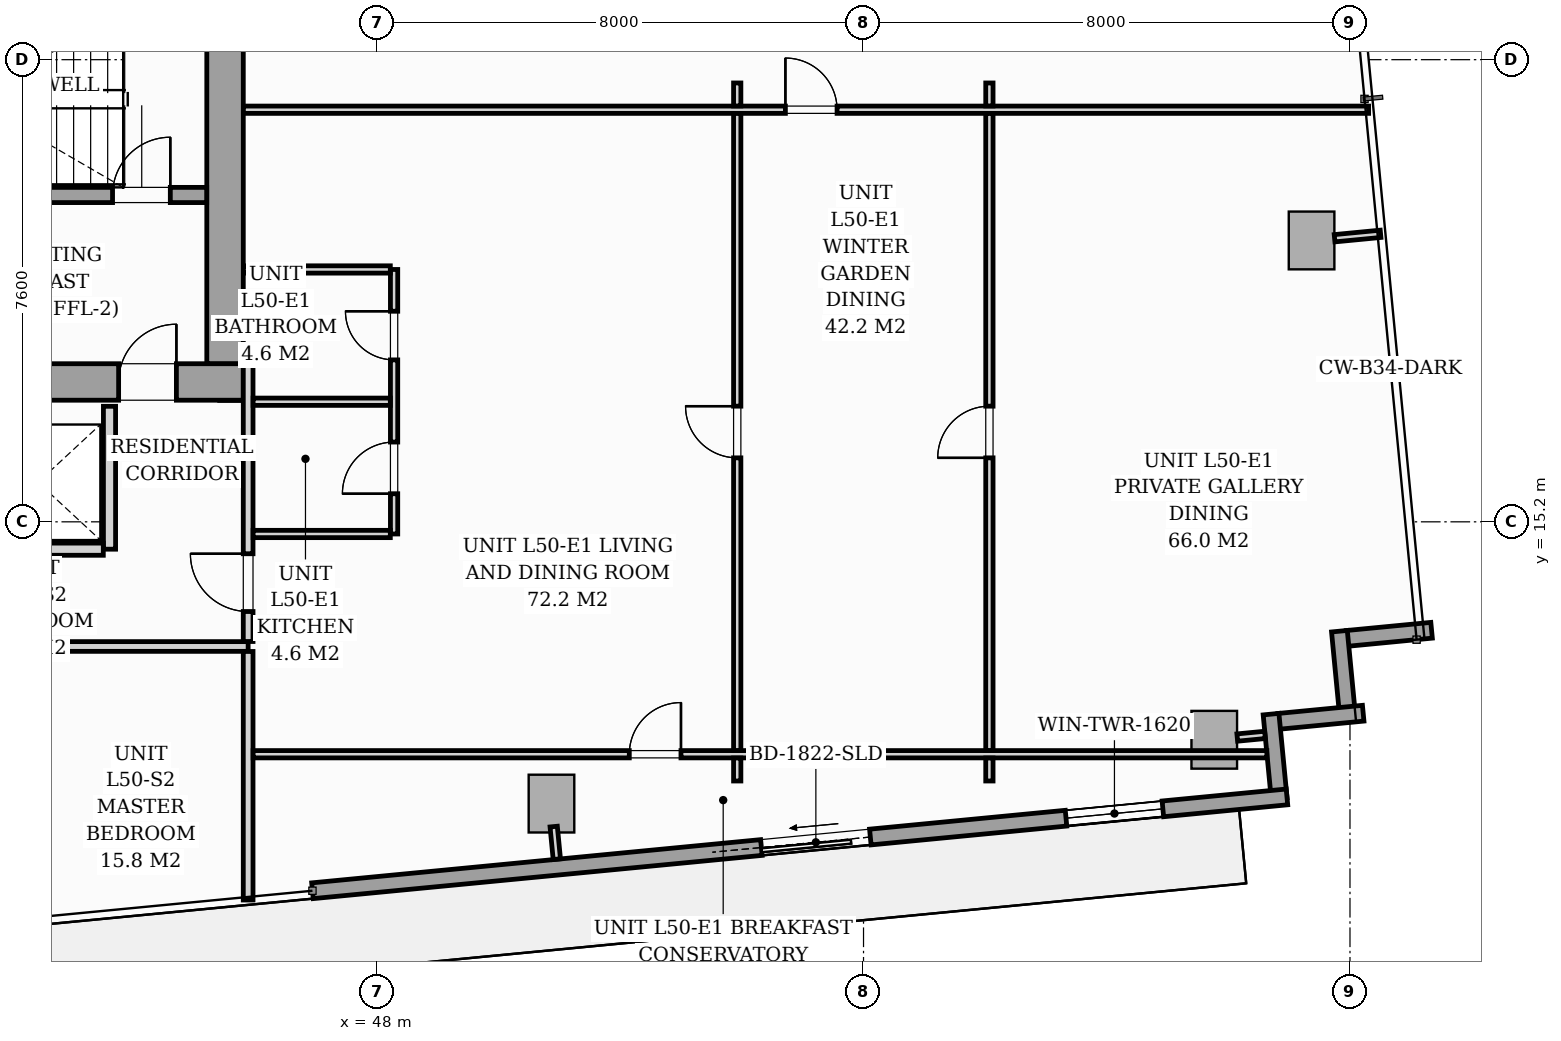
"""IFC4 building model, lengths in metres.
Left out: names, types, materials, properties, quantities, classifications, styles, units other than length and angle.
Written with IfcOpenShell. Run it as: python <this file> out.ifc"""

import sys

from ifc_helpers import new_model, si_unit, direction, frame, frame_2d, origin, origin_2d, place, context, subcontext, project, spatial, rectangle, i_section, extrude, source, transform, mapped, element, fill, save


model = new_model("IFC4")
c1 = context("Model", 3, precision=1e-05, world=origin(), true_north=direction((0.0, 1.0)))
c2 = subcontext(c1, "Body", "Model", "MODEL_VIEW")
j1 = project(units=[si_unit("LENGTHUNIT", "METRE"), si_unit("PLANEANGLEUNIT", "RADIAN")], contexts=[c1])
p1 = place(None, origin())
s1 = spatial("IfcSite", under=j1, at=p1, CompositionType="ELEMENT")
p2 = place(p1, origin())
s2 = spatial("IfcBuilding", under=s1, at=p2, CompositionType="ELEMENT")
p3 = place(p2, frame((0.0, 0.0, 176.2)))
s3 = spatial("IfcBuildingStorey", under=s2, at=p3, CompositionType="ELEMENT", Elevation=176.2)
m1 = source(origin(), c2, "Body", "SweptSolid", [
    extrude(i_section(OverallWidth=0.416, OverallDepth=0.446, WebThickness=0.039, FlangeThickness=0.063, FilletRadius=0.018, at=origin_2d()), origin(), (0.0, 0.0, 1.0), 3.196),
])
p4 = place(p3, frame((45.6, 17.4, 0.002), z_axis=(0.0, 0.0, 1.0), x_axis=(1.0, 0.0, 0.0)))
e1 = element("IfcColumn", 1, at=p4, inside=s3, PredefinedType="PILASTER", context=c2, shape_type="MappedRepresentation", body=[
    mapped(m1, transform((0.0, 0.0, 0.0), scale=1.0)),
])
m2 = source(origin(), c2, "Body", "SweptSolid", [
    extrude(rectangle(XDim=0.75, YDim=0.95, at=origin_2d()), origin(), (0.0, 0.0, 1.0), 3.196),
])
for number, where, z_axis, x_axis in (
    (2, (50.868, 10.566, 0.002), (0.0, 0.0, 1.0), (0.995, 0.096, 0.0)),
    (3, (61.768, 11.616, 0.002), (0.0, 0.0, 1.0), (0.995, 0.096, 0.0)),
    (4, (63.368, 19.827, 0.002), (0.0, 0.0, 1.0), (0.995, 0.096, 0.0)),
):
    element("IfcColumn", number, at=place(p3, frame(where, z_axis=z_axis, x_axis=x_axis)), inside=s3, PredefinedType="COLUMN", context=c2, shape_type="MappedRepresentation", body=[
        mapped(m2, transform((0.0, 0.0, 0.0), scale=1.0)),
    ])
p5 = place(p3, frame((65.342, 13.417, 0.0), z_axis=(0.0, 0.0, 1.0), x_axis=(-0.99540774648, -0.095725744959, 0.0)))
e5 = element("IfcWall", 5, at=p5, inside=s3, PredefinedType="STANDARD", context=c2, shape_type="SweptSolid", body=[
    extrude(rectangle(XDim=1.395, YDim=0.26, at=frame_2d((0.698, 0.0))), origin(), (0.0, 0.0, 1.0), 2.94),
])
p6 = place(p3, frame((63.826, 13.401, 0.0), z_axis=(0.0, 0.0, 1.0), x_axis=(0.095915846097, -0.995389446633, 0.0)))
e6 = element("IfcWall", 6, at=p6, inside=s3, PredefinedType="STANDARD", context=c2, shape_type="SweptSolid", body=[
    extrude(rectangle(XDim=1.395, YDim=0.26, at=frame_2d((0.697, 0.0))), origin(), (0.0, 0.0, 1.0), 2.94),
])
for number, where, z_axis, x_axis in (
    (7, (64.217, 12.053, 0.0), (0.0, 0.0, 1.0), (-0.995, -0.096, 0.0)),
    (8, (62.702, 12.037, 0.0), (0.0, 0.0, 1.0), (0.096, -0.995, 0.0)),
):
    element("IfcWall", number, at=place(p3, frame(where, z_axis=z_axis, x_axis=x_axis)), inside=s3, PredefinedType="STANDARD", context=c2, shape_type="SweptSolid", body=[
        extrude(rectangle(XDim=1.395, YDim=0.26, at=frame_2d((0.698, 0.0))), origin(), (0.0, 0.0, 1.0), 2.94),
    ])
p7 = place(p3, frame((62.963, 10.676, 0.0), z_axis=(0.0, 0.0, 1.0), x_axis=(-0.995395627913, -0.095851676732, 0.0)))
e9 = element("IfcWall", 9, at=p7, inside=s3, PredefinedType="STANDARD", context=c2, shape_type="SweptSolid", body=[
    extrude(rectangle(XDim=16.1, YDim=0.26, at=frame_2d((8.05, 0.0))), origin(), (0.0, 0.0, 1.0), 2.94),
])
p8 = place(p7, frame((6.883, 0.0, 0.0)))
e10 = element("IfcOpeningElement", 10, at=p8, cuts=e9, PredefinedType="OPENING", context=c2, shape_type="SweptSolid", body=[
    extrude(rectangle(XDim=1.8, YDim=2.06, at=frame_2d((0.9, 1.03))), frame((0.0, 0.14, 0.0), z_axis=(0.0, -1.0, 0.0), x_axis=(1.0, 0.0, 0.0)), (0.0, 0.0, 1.0), 0.28),
])
p9 = place(p7, frame((2.05, 0.0, 0.65)))
e11 = element("IfcOpeningElement", 11, at=p9, cuts=e9, PredefinedType="OPENING", context=c2, shape_type="SweptSolid", body=[
    extrude(rectangle(XDim=1.6, YDim=1.5, at=frame_2d((0.8, 0.75))), frame((0.0, 0.14, 0.0), z_axis=(0.0, -1.0, 0.0), x_axis=(1.0, 0.0, 0.0)), (0.0, 0.0, 1.0), 0.28),
])
p10 = place(p3, frame((26.2, 17.5, 0.0), z_axis=(0.0, 0.0, 1.0), x_axis=(1.0, 0.0, 0.0)))
e12 = element("IfcWall", 12, at=p10, inside=s3, PredefinedType="SHEAR", context=c2, shape_type="SweptSolid", body=[
    extrude(rectangle(XDim=19.6, YDim=0.6, at=frame_2d((9.8, 0.0))), origin(), (0.0, 0.0, 1.0), 3.2),
])
p11 = place(p10, frame((0.95, 0.0, 0.0)))
e13 = element("IfcOpeningElement", 13, at=p11, cuts=e12, PredefinedType="OPENING", context=c2, shape_type="SweptSolid", body=[
    extrude(rectangle(XDim=0.95, YDim=2.06, at=frame_2d((0.475, 1.03))), frame((0.0, 0.31, 0.0), z_axis=(0.0, -1.0, 0.0), x_axis=(1.0, 0.0, 0.0)), (0.0, 0.0, 1.0), 0.62),
])
p12 = place(p10, frame((9.38, 0.0, 0.0)))
e14 = element("IfcOpeningElement", 14, at=p12, cuts=e12, PredefinedType="OPENING", context=c2, shape_type="SweptSolid", body=[
    extrude(rectangle(XDim=0.85, YDim=2.0, at=frame_2d((0.425, 1.0))), frame((0.0, 0.31, 0.0), z_axis=(0.0, -1.0, 0.0), x_axis=(1.0, 0.0, 0.0)), (0.0, 0.0, 1.0), 0.62),
])
p13 = place(p10, frame((17.55, 0.0, 0.0)))
e15 = element("IfcOpeningElement", 15, at=p13, cuts=e12, PredefinedType="OPENING", context=c2, shape_type="SweptSolid", body=[
    extrude(rectangle(XDim=0.95, YDim=2.06, at=frame_2d((0.475, 1.03))), frame((0.0, 0.31, 0.0), z_axis=(0.0, -1.0, 0.0), x_axis=(1.0, 0.0, 0.0)), (0.0, 0.0, 1.0), 0.62),
])
p14 = place(p3, frame((45.5, 17.802, 0.0), z_axis=(0.0, 0.0, 1.0), x_axis=(0.0, 1.0, 0.0)))
e16 = element("IfcWall", 16, at=p14, inside=s3, PredefinedType="SHEAR", context=c2, shape_type="SweptSolid", body=[
    extrude(rectangle(XDim=5.796, YDim=0.6, at=frame_2d((2.898, 0.0))), origin(), (0.0, 0.0, 1.0), 3.2),
])
p15 = place(p3, frame((37.05, 20.575, 0.0), z_axis=(0.0, 0.0, 1.0), x_axis=(1.0, 0.0, 0.0)))
e17 = element("IfcWall", 17, at=p15, inside=s3, PredefinedType="SOLIDWALL", context=c2, shape_type="SweptSolid", body=[
    extrude(rectangle(XDim=8.148, YDim=0.25, at=frame_2d((4.074, 0.0))), origin(), (0.0, 0.0, 1.0), 3.2),
])
p16 = place(p15, frame((6.6, 0.0, 0.0)))
e18 = element("IfcOpeningElement", 18, at=p16, cuts=e17, PredefinedType="OPENING", context=c2, shape_type="SweptSolid", body=[
    extrude(rectangle(XDim=0.95, YDim=2.06, at=frame_2d((0.475, 1.03))), frame((0.0, 0.135, 0.0), z_axis=(0.0, -1.0, 0.0), x_axis=(1.0, 0.0, 0.0)), (0.0, 0.0, 1.0), 0.27),
])
p17 = place(p3, frame((43.6, 14.75, 0.0), z_axis=(0.0, 0.0, 1.0), x_axis=(0.0, 1.0, 0.0)))
e19 = element("IfcWall", 19, at=p17, inside=s3, PredefinedType="PARTITIONING", context=c2, shape_type="SweptSolid", body=[
    extrude(rectangle(XDim=2.35, YDim=0.2, at=frame_2d((1.175, 0.0))), origin(), (0.0, 0.0, 1.0), 2.94),
])
p18 = place(p3, frame((41.352, 14.75, 0.0), z_axis=(0.0, 0.0, 1.0), x_axis=(1.0, 0.0, 0.0)))
e20 = element("IfcWall", 20, at=p18, inside=s3, PredefinedType="PARTITIONING", context=c2, shape_type="SweptSolid", body=[
    extrude(rectangle(XDim=2.146, YDim=0.2, at=frame_2d((1.073, 0.0))), origin(), (0.0, 0.0, 1.0), 2.94),
])
p19 = place(p3, frame((22.6, 13.15, 0.0), z_axis=(0.0, 0.0, 1.0), x_axis=(1.0, 0.0, 0.0)))
e21 = element("IfcWall", 21, at=p19, inside=s3, PredefinedType="PARTITIONING", context=c2, shape_type="SweptSolid", body=[
    extrude(rectangle(XDim=23.28, YDim=0.16, at=frame_2d((11.64, 0.0))), origin(), (0.0, 0.0, 1.0), 2.94),
])
p20 = place(p19, frame((0.607, 0.0, 0.0)))
e22 = element("IfcOpeningElement", 22, at=p20, cuts=e21, PredefinedType="OPENING", context=c2, shape_type="SweptSolid", body=[
    extrude(rectangle(XDim=0.95, YDim=2.06, at=frame_2d((0.475, 1.03))), frame((0.0, 0.09, 0.0), z_axis=(0.0, -1.0, 0.0), x_axis=(1.0, 0.0, 0.0)), (0.0, 0.0, 1.0), 0.18),
])
p21 = place(p19, frame((11.717, 0.0, 0.0)))
e23 = element("IfcOpeningElement", 23, at=p21, cuts=e21, PredefinedType="OPENING", context=c2, shape_type="SweptSolid", body=[
    extrude(rectangle(XDim=0.95, YDim=2.06, at=frame_2d((0.475, 1.03))), frame((0.0, 0.09, 0.0), z_axis=(0.0, -1.0, 0.0), x_axis=(1.0, 0.0, 0.0)), (0.0, 0.0, 1.0), 0.18),
])
p22 = place(p3, frame((45.88, 8.981, 0.0), z_axis=(0.0, 0.0, 1.0), x_axis=(0.0, 1.0, 0.0)))
e24 = element("IfcWall", 24, at=p22, inside=s3, PredefinedType="PARTITIONING", context=c2, shape_type="SweptSolid", body=[
    extrude(rectangle(XDim=4.087, YDim=0.16, at=frame_2d((2.043, 0.0))), origin(), (0.0, 0.0, 1.0), 2.94),
])
p23 = place(p3, frame((45.88, 13.232, 0.0), z_axis=(0.0, 0.0, 1.0), x_axis=(0.0, 1.0, 0.0)))
e25 = element("IfcWall", 25, at=p23, inside=s3, PredefinedType="PARTITIONING", context=c2, shape_type="SweptSolid", body=[
    extrude(rectangle(XDim=4.57, YDim=0.16, at=frame_2d((2.285, 0.0))), origin(), (0.0, 0.0, 1.0), 2.94),
])
p24 = place(p23, frame((0.493, 0.0, 0.0)))
e26 = element("IfcOpeningElement", 26, at=p24, cuts=e25, PredefinedType="OPENING", context=c2, shape_type="SweptSolid", body=[
    extrude(rectangle(XDim=0.95, YDim=2.06, at=frame_2d((0.475, 1.03))), frame((0.0, 0.09, 0.0), z_axis=(0.0, -1.0, 0.0), x_axis=(1.0, 0.0, 0.0)), (0.0, 0.0, 1.0), 0.18),
])
p25 = place(p3, frame((48.28, 15.0, 0.0), z_axis=(0.0, 0.0, 1.0), x_axis=(0.0, 1.0, 0.0)))
e27 = element("IfcWall", 27, at=p25, inside=s3, PredefinedType="PARTITIONING", context=c2, shape_type="SweptSolid", body=[
    extrude(rectangle(XDim=4.35, YDim=0.12, at=frame_2d((2.175, 0.0))), origin(), (0.0, 0.0, 1.0), 2.94),
])
p26 = place(p25, frame((0.662, 0.0, 0.0)))
e28 = element("IfcOpeningElement", 28, at=p26, cuts=e27, PredefinedType="OPENING", context=c2, shape_type="SweptSolid", body=[
    extrude(rectangle(XDim=0.85, YDim=2.05, at=frame_2d((0.425, 1.025))), frame((0.0, 0.07, 0.0), z_axis=(0.0, -1.0, 0.0), x_axis=(1.0, 0.0, 0.0)), (0.0, 0.0, 1.0), 0.14),
])
p27 = place(p25, frame((2.863, 0.0, 0.0)))
e29 = element("IfcOpeningElement", 29, at=p27, cuts=e27, PredefinedType="OPENING", context=c2, shape_type="SweptSolid", body=[
    extrude(rectangle(XDim=0.8, YDim=2.02, at=frame_2d((0.4, 1.01))), frame((0.0, 0.07, 0.0), z_axis=(0.0, -1.0, 0.0), x_axis=(1.0, 0.0, 0.0)), (0.0, 0.0, 1.0), 0.14),
])
for number, where, z_axis, x_axis in (
    (30, (45.962, 17.175, 0.0), (0.0, 0.0, 1.0), (1.0, 0.0, 0.0)),
    (31, (45.962, 15.0, 0.0), (0.0, 0.0, 1.0), (1.0, 0.0, 0.0)),
):
    element("IfcWall", number, at=place(p3, frame(where, z_axis=z_axis, x_axis=x_axis)), inside=s3, PredefinedType="PARTITIONING", context=c2, shape_type="SweptSolid", body=[
        extrude(rectangle(XDim=2.256, YDim=0.12, at=frame_2d((1.128, 0.0))), origin(), (0.0, 0.0, 1.0), 2.94),
    ])
p28 = place(p3, frame((45.802, 19.35, 0.0), z_axis=(0.0, 0.0, 1.0), x_axis=(1.0, 0.0, 0.0)))
e32 = element("IfcWall", 32, at=p28, inside=s3, PredefinedType="PARTITIONING", context=c2, shape_type="SweptSolid", body=[
    extrude(rectangle(XDim=2.416, YDim=0.12, at=frame_2d((1.208, 0.0))), origin(), (0.0, 0.0, 1.0), 2.94),
])
p29 = place(p3, frame((45.802, 21.977, 0.0), z_axis=(0.0, 0.0, 1.0), x_axis=(1.0, 0.0, 0.0)))
e33 = element("IfcWall", 33, at=p29, inside=s3, PredefinedType="PARTITIONING", context=c2, shape_type="SweptSolid", body=[
    extrude(rectangle(XDim=18.504, YDim=0.12, at=frame_2d((9.252, 0.0))), origin(), (0.0, 0.0, 1.0), 2.94),
])
p30 = place(p29, frame((8.913, 0.0, 0.0)))
e34 = element("IfcOpeningElement", 34, at=p30, cuts=e33, PredefinedType="OPENING", context=c2, shape_type="SweptSolid", body=[
    extrude(rectangle(XDim=0.85, YDim=2.05, at=frame_2d((0.425, 1.025))), frame((0.0, 0.07, 0.0), z_axis=(0.0, -1.0, 0.0), x_axis=(1.0, 0.0, 0.0)), (0.0, 0.0, 1.0), 0.14),
])
p31 = place(p3, frame((45.962, 11.378, 0.0), z_axis=(0.0, 0.0, 1.0), x_axis=(1.0, 0.0, 0.0)))
e35 = element("IfcWall", 35, at=p31, inside=s3, PredefinedType="PARTITIONING", context=c2, shape_type="SweptSolid", body=[
    extrude(rectangle(XDim=16.671, YDim=0.12, at=frame_2d((8.335, 0.0))), origin(), (0.0, 0.0, 1.0), 2.383),
])
p32 = place(p31, frame((6.186, 0.0, 0.0)))
e36 = element("IfcOpeningElement", 36, at=p32, cuts=e35, PredefinedType="OPENING", context=c2, shape_type="SweptSolid", body=[
    extrude(rectangle(XDim=0.85, YDim=2.05, at=frame_2d((0.425, 1.025))), frame((0.0, 0.07, 0.0), z_axis=(0.0, -1.0, 0.0), x_axis=(1.0, 0.0, 0.0)), (0.0, 0.0, 1.0), 0.14),
])
p33 = place(p3, frame((58.07, 10.938, 0.0), z_axis=(0.0, 0.0, 1.0), x_axis=(0.0, 1.0, 0.0)))
e37 = element("IfcWall", 37, at=p33, inside=s3, PredefinedType="PARTITIONING", context=c2, shape_type="SweptSolid", body=[
    extrude(rectangle(XDim=0.378, YDim=0.12, at=frame_2d((0.189, 0.0))), origin(), (0.0, 0.0, 1.0), 2.94),
])
p34 = place(p3, frame((58.07, 11.44, 0.0), z_axis=(0.0, 0.0, 1.0), x_axis=(0.0, 1.0, 0.0)))
e38 = element("IfcWall", 38, at=p34, inside=s3, PredefinedType="PARTITIONING", context=c2, shape_type="SweptSolid", body=[
    extrude(rectangle(XDim=10.475, YDim=0.12, at=frame_2d((5.238, 0.0))), origin(), (0.0, 0.0, 1.0), 2.94),
])
p35 = place(p34, frame((4.812, 0.0, 0.0)))
e39 = element("IfcOpeningElement", 39, at=p35, cuts=e38, PredefinedType="OPENING", context=c2, shape_type="SweptSolid", body=[
    extrude(rectangle(XDim=0.85, YDim=2.05, at=frame_2d((0.425, 1.025))), frame((0.0, 0.07, 0.0), z_axis=(0.0, -1.0, 0.0), x_axis=(1.0, 0.0, 0.0)), (0.0, 0.0, 1.0), 0.14),
])
for number, where, z_axis, x_axis in (
    (40, (58.07, 22.039, 0.0), (0.0, 0.0, 1.0), (0.0, 1.0, 0.0)),
    (41, (53.923, 10.938, 0.0), (0.0, 0.0, 1.0), (0.0, 1.0, 0.0)),
):
    element("IfcWall", number, at=place(p3, frame(where, z_axis=z_axis, x_axis=x_axis)), inside=s3, PredefinedType="PARTITIONING", context=c2, shape_type="SweptSolid", body=[
        extrude(rectangle(XDim=0.378, YDim=0.12, at=frame_2d((0.189, 0.0))), origin(), (0.0, 0.0, 1.0), 2.94),
    ])
p36 = place(p3, frame((53.923, 11.44, 0.0), z_axis=(0.0, 0.0, 1.0), x_axis=(0.0, 1.0, 0.0)))
e42 = element("IfcWall", 42, at=p36, inside=s3, PredefinedType="PARTITIONING", context=c2, shape_type="SweptSolid", body=[
    extrude(rectangle(XDim=10.475, YDim=0.12, at=frame_2d((5.238, 0.0))), origin(), (0.0, 0.0, 1.0), 2.94),
])
p37 = place(p36, frame((4.812, 0.0, 0.0)))
e43 = element("IfcOpeningElement", 43, at=p37, cuts=e42, PredefinedType="OPENING", context=c2, shape_type="SweptSolid", body=[
    extrude(rectangle(XDim=0.85, YDim=2.05, at=frame_2d((0.425, 1.025))), frame((0.0, 0.07, 0.0), z_axis=(0.0, -1.0, 0.0), x_axis=(1.0, 0.0, 0.0)), (0.0, 0.0, 1.0), 0.14),
])
p38 = place(p3, frame((53.923, 22.039, 0.0), z_axis=(0.0, 0.0, 1.0), x_axis=(0.0, 1.0, 0.0)))
e44 = element("IfcWall", 44, at=p38, inside=s3, PredefinedType="PARTITIONING", context=c2, shape_type="SweptSolid", body=[
    extrude(rectangle(XDim=0.378, YDim=0.12, at=frame_2d((0.189, 0.0))), origin(), (0.0, 0.0, 1.0), 2.94),
])
p39 = place(p3, frame((50.905, 10.188, 0.0), z_axis=(0.0, 0.0, 1.0), x_axis=(0.095772948675, -0.995403205893, 0.0)))
e45 = element("IfcWall", 45, at=p39, inside=s3, PredefinedType="PARTITIONING", context=c2, shape_type="SweptSolid", body=[
    extrude(rectangle(XDim=0.538, YDim=0.12, at=frame_2d((0.269, 0.0))), origin(), (0.0, 0.0, 1.0), 2.94),
])
p40 = place(p3, frame((62.146, 11.652, 0.0), z_axis=(0.0, 0.0, 1.0), x_axis=(0.995384576284, 0.09596637586, 0.0)))
e46 = element("IfcWall", 46, at=p40, inside=s3, PredefinedType="PARTITIONING", context=c2, shape_type="SweptSolid", body=[
    extrude(rectangle(XDim=0.458, YDim=0.12, at=frame_2d((0.229, 0.0))), origin(), (0.0, 0.0, 1.0), 2.94),
])
p41 = place(p3, frame((63.747, 19.864, 0.0), z_axis=(0.0, 0.0, 1.0), x_axis=(0.995405496295, 0.095749140702, 0.0)))
e47 = element("IfcWall", 47, at=p41, inside=s3, PredefinedType="PARTITIONING", context=c2, shape_type="SweptSolid", body=[
    extrude(rectangle(XDim=0.76, YDim=0.12, at=frame_2d((0.38, 0.0))), origin(), (0.0, 0.0, 1.0), 2.94),
])
m3 = source(origin(), c2, "Body", "SweptSolid", [
    extrude(rectangle(XDim=1.8, YDim=2.06, at=frame_2d((0.9, 1.03))), frame((0.0, 0.025, 0.0), z_axis=(0.0, -1.0, 0.0), x_axis=(1.0, 0.0, 0.0)), (0.0, 0.0, 1.0), 0.05),
])
p42 = place(p8, origin())
e48 = element("IfcDoor", 48, at=p42, inside=s3, OperationType="SLIDING_TO_RIGHT", PredefinedType="DOOR", context=c2, shape_type="MappedRepresentation", body=[
    mapped(m3, transform((0.0, 0.0, 0.0), scale=1.0)),
])
fill(e10, e48)
m4 = source(origin(), c2, "Body", "SweptSolid", [
    extrude(rectangle(XDim=1.6, YDim=1.5, at=frame_2d((0.8, 0.75))), frame((0.0, 0.03, 0.0), z_axis=(0.0, -1.0, 0.0), x_axis=(1.0, 0.0, 0.0)), (0.0, 0.0, 1.0), 0.06),
])
p43 = place(p9, origin())
e49 = element("IfcWindow", 49, at=p43, inside=s3, PartitioningType="SINGLE_PANEL", PredefinedType="WINDOW", context=c2, shape_type="MappedRepresentation", body=[
    mapped(m4, transform((0.0, 0.0, 0.0), scale=1.0)),
])
fill(e11, e49)
m5 = source(origin(), c2, "Body", "SweptSolid", [
    extrude(rectangle(XDim=0.95, YDim=2.06, at=frame_2d((0.475, 1.03))), frame((0.0, 0.025, 0.0), z_axis=(0.0, -1.0, 0.0), x_axis=(1.0, 0.0, 0.0)), (0.0, 0.0, 1.0), 0.05),
])
p44 = place(p13, origin())
e50 = element("IfcDoor", 50, at=p44, inside=s3, OperationType="SINGLE_SWING_RIGHT", PredefinedType="DOOR", context=c2, shape_type="MappedRepresentation", body=[
    mapped(m5, transform((0.0, 0.0, 0.0), scale=1.0)),
])
fill(e15, e50)
p45 = place(p16, origin())
e51 = element("IfcDoor", 51, at=p45, inside=s3, OperationType="SINGLE_SWING_RIGHT", PredefinedType="DOOR", context=c2, shape_type="MappedRepresentation", body=[
    mapped(m5, transform((0.0, 0.0, 0.0), scale=1.0)),
])
fill(e18, e51)
m6 = source(origin(), c2, "Body", "SweptSolid", [
    extrude(rectangle(XDim=0.95, YDim=2.06, at=frame_2d((0.475, 1.03))), frame((0.0, 0.025, 0.0), z_axis=(0.0, -1.0, 0.0), x_axis=(1.0, 0.0, 0.0)), (0.0, 0.0, 1.0), 0.05),
])
p46 = place(p24, origin())
e52 = element("IfcDoor", 52, at=p46, inside=s3, OperationType="SINGLE_SWING_RIGHT", PredefinedType="DOOR", context=c2, shape_type="MappedRepresentation", body=[
    mapped(m6, transform((0.0, 0.0, 0.0), scale=1.0)),
])
fill(e26, e52)
m7 = source(origin(), c2, "Body", "SweptSolid", [
    extrude(rectangle(XDim=0.85, YDim=2.05, at=frame_2d((0.425, 1.025))), frame((0.0, 0.025, 0.0), z_axis=(0.0, -1.0, 0.0), x_axis=(1.0, 0.0, 0.0)), (0.0, 0.0, 1.0), 0.05),
])
p47 = place(p26, origin())
e53 = element("IfcDoor", 53, at=p47, inside=s3, OperationType="SINGLE_SWING_LEFT", PredefinedType="DOOR", context=c2, shape_type="MappedRepresentation", body=[
    mapped(m7, transform((0.0, 0.0, 0.0), scale=1.0)),
])
fill(e28, e53)
m8 = source(origin(), c2, "Body", "SweptSolid", [
    extrude(rectangle(XDim=0.8, YDim=2.02, at=frame_2d((0.4, 1.01))), frame((0.0, 0.025, 0.0), z_axis=(0.0, -1.0, 0.0), x_axis=(1.0, 0.0, 0.0)), (0.0, 0.0, 1.0), 0.05),
])
p48 = place(p27, origin())
e54 = element("IfcDoor", 54, at=p48, inside=s3, OperationType="SINGLE_SWING_RIGHT", PredefinedType="DOOR", context=c2, shape_type="MappedRepresentation", body=[
    mapped(m8, transform((0.0, 0.0, 0.0), scale=1.0)),
])
fill(e29, e54)
p49 = place(p30, origin())
e55 = element("IfcDoor", 55, at=p49, inside=s3, OperationType="SINGLE_SWING_LEFT", PredefinedType="DOOR", context=c2, shape_type="MappedRepresentation", body=[
    mapped(m7, transform((0.0, 0.0, 0.0), scale=1.0)),
])
fill(e34, e55)
p50 = place(p32, origin())
e56 = element("IfcDoor", 56, at=p50, inside=s3, OperationType="SINGLE_SWING_RIGHT", PredefinedType="DOOR", context=c2, shape_type="MappedRepresentation", body=[
    mapped(m7, transform((0.0, 0.0, 0.0), scale=1.0)),
])
fill(e36, e56)
p51 = place(p35, origin())
e57 = element("IfcDoor", 57, at=p51, inside=s3, OperationType="SINGLE_SWING_LEFT", PredefinedType="DOOR", context=c2, shape_type="MappedRepresentation", body=[
    mapped(m7, transform((0.0, 0.0, 0.0), scale=1.0)),
])
fill(e39, e57)
p52 = place(p37, origin())
e58 = element("IfcDoor", 58, at=p52, inside=s3, OperationType="SINGLE_SWING_RIGHT", PredefinedType="DOOR", context=c2, shape_type="MappedRepresentation", body=[
    mapped(m7, transform((0.0, 0.0, 0.0), scale=1.0)),
])
fill(e43, e58)
save(model, sys.argv[1])
